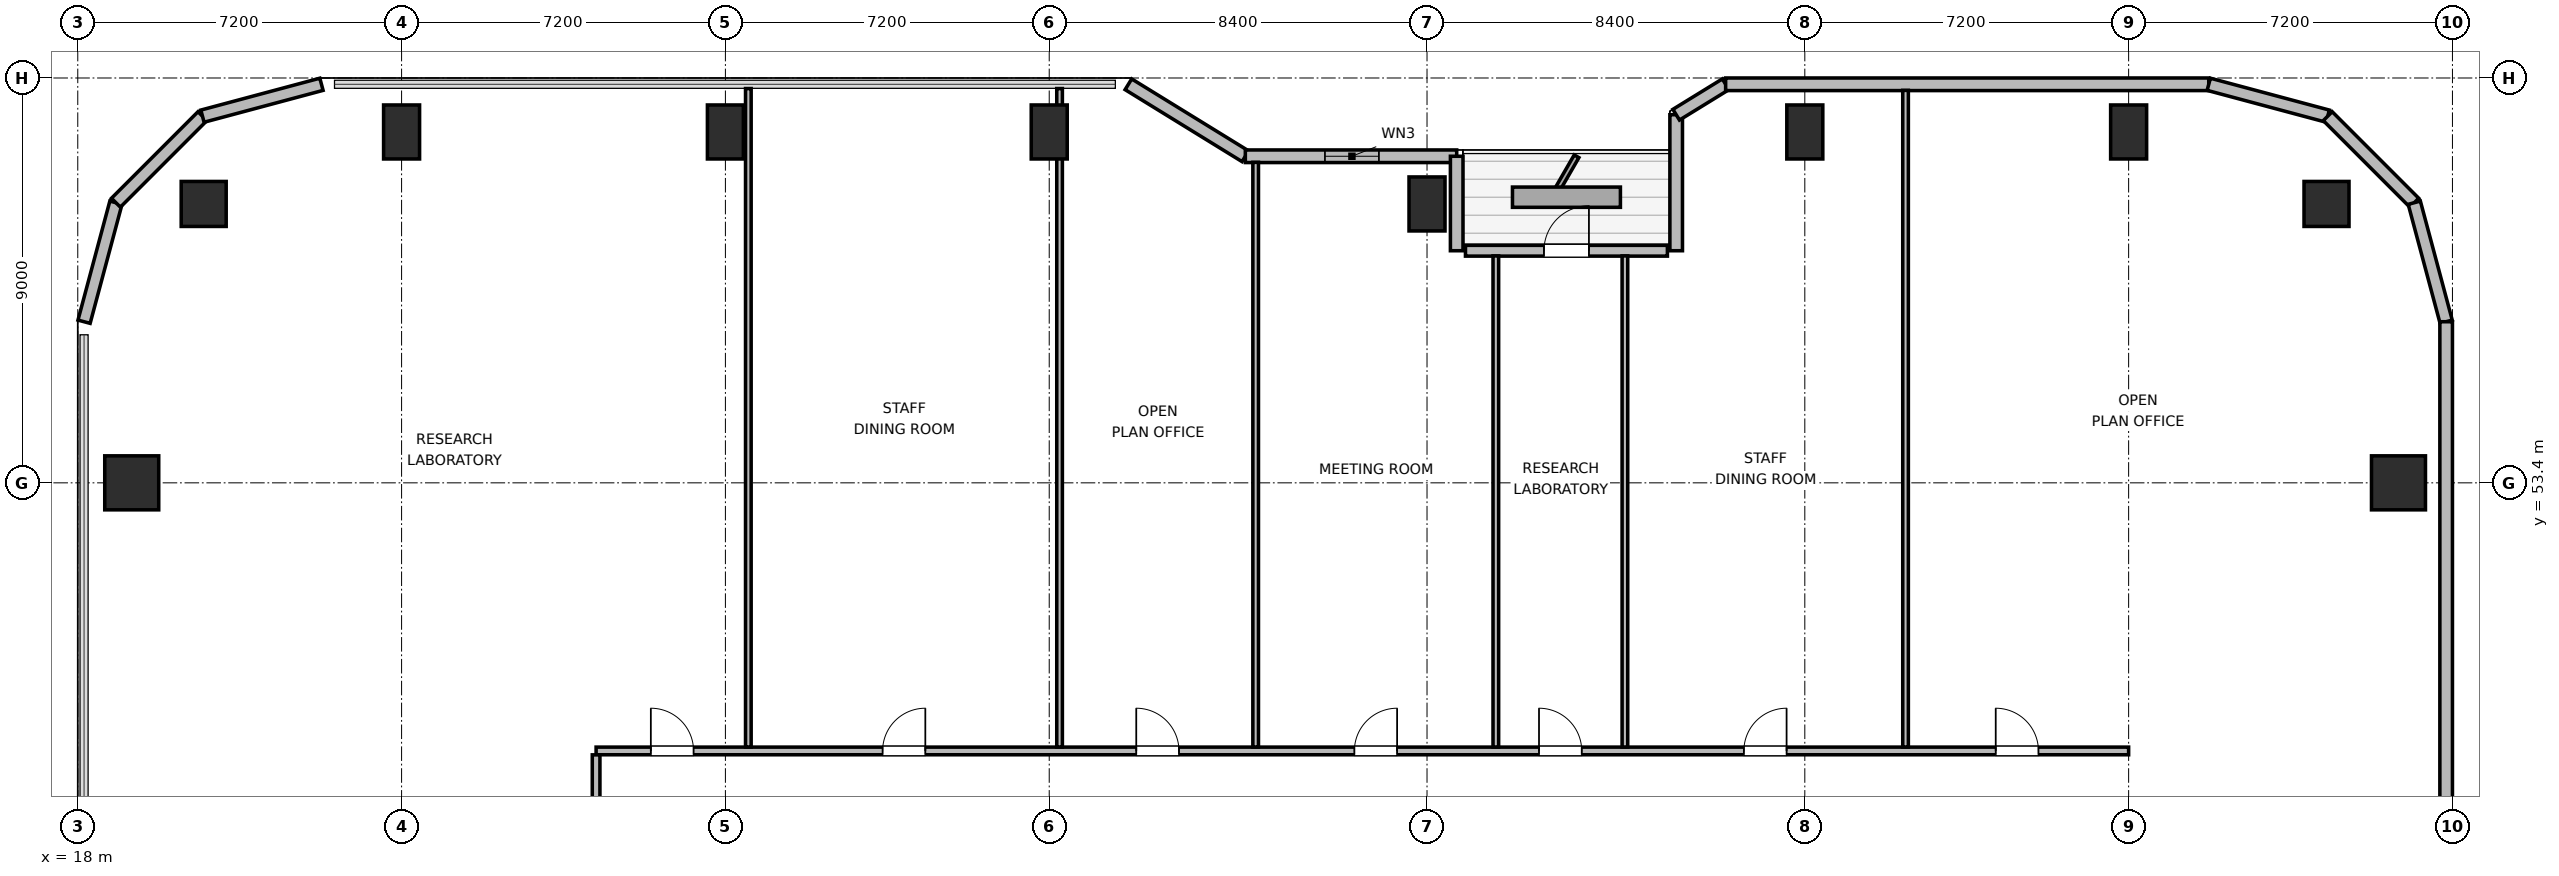
"""IFC4 building model, lengths in metres.
Left out: names, types, materials, properties, quantities, classifications, styles, units other than length and angle.
Written with IfcOpenShell. Run it as: python <this file> out.ifc"""

import sys

from ifc_helpers import new_model, si_unit, direction, frame, frame_2d, origin, origin_2d, place, context, subcontext, project, spatial, rectangle, circle, extrude, element, fill, save


model = new_model("IFC4")
c1 = context("Model", 3, precision=1e-05, world=origin(), true_north=direction((0.0, 1.0)))
c2 = subcontext(c1, "Body", "Model", "MODEL_VIEW")
j1 = project(units=[si_unit("LENGTHUNIT", "METRE"), si_unit("PLANEANGLEUNIT", "RADIAN")], contexts=[c1])
p1 = place(None, origin())
s1 = spatial("IfcSite", under=j1, at=p1, CompositionType="ELEMENT")
p2 = place(p1, origin())
s2 = spatial("IfcBuilding", under=s1, at=p2, CompositionType="ELEMENT")
p3 = place(p2, frame((0.0, 0.0, 177.9)))
s3 = spatial("IfcBuildingStorey", under=s2, at=p3, CompositionType="ELEMENT", Elevation=177.9)
for number, where, z_axis, x_axis in (
    (1, (68.0, 59.6, 0.0), (0.0, 0.0, 1.0), (1.0, 0.0, 0.0)),
    (2, (20.8, 59.6, 0.0), (0.0, 0.0, 1.0), (1.0, 0.0, 0.0)),
):
    element("IfcColumn", number, at=place(p3, frame(where, z_axis=z_axis, x_axis=x_axis)), inside=s3, PredefinedType="COLUMN", context=c2, shape_type="SweptSolid", body=[
        extrude(circle(Radius=0.5, at=origin_2d()), origin(), (0.0, 0.0, 1.0), 3.9),
    ])
for number, where, z_axis, x_axis in (
    (3, (25.2, 61.2, 0.0), (0.0, 0.0, 1.0), (1.0, 0.0, 0.0)),
    (4, (32.4, 61.2, 0.0), (0.0, 0.0, 1.0), (1.0, 0.0, 0.0)),
    (5, (39.6, 61.2, 0.0), (0.0, 0.0, 1.0), (1.0, 0.0, 0.0)),
    (6, (48.0, 59.6, 0.0), (0.0, 0.0, 1.0), (1.0, 0.0, 0.0)),
    (7, (56.4, 61.2, 0.0), (0.0, 0.0, 1.0), (1.0, 0.0, 0.0)),
    (8, (63.6, 61.2, 0.0), (0.0, 0.0, 1.0), (1.0, 0.0, 0.0)),
):
    element("IfcColumn", number, at=place(p3, frame(where, z_axis=z_axis, x_axis=x_axis)), inside=s3, PredefinedType="COLUMN", context=c2, shape_type="SweptSolid", body=[
        extrude(rectangle(XDim=0.8, YDim=1.2, at=origin_2d()), origin(), (0.0, 0.0, 1.0), 3.9),
    ])
for number, where, z_axis, x_axis in (
    (9, (19.2, 53.4, 0.0), (0.0, 0.0, 1.0), (1.0, 0.0, 0.0)),
    (10, (69.6, 53.4, 0.0), (0.0, 0.0, 1.0), (1.0, 0.0, 0.0)),
):
    element("IfcColumn", number, at=place(p3, frame(where, z_axis=z_axis, x_axis=x_axis)), inside=s3, PredefinedType="COLUMN", context=c2, shape_type="SweptSolid", body=[
        extrude(rectangle(XDim=1.2, YDim=1.2, at=origin_2d()), origin(), (0.0, 0.0, 1.0), 3.9),
    ])
p4 = place(p3, frame((18.14, 56.982, 0.0), z_axis=(0.0, 0.0, 1.0), x_axis=(0.258672222976, 0.9659651552, 0.0)))
e11 = element("IfcWall", 11, at=p4, inside=s3, PredefinedType="SOLIDWALL", context=c2, shape_type="SweptSolid", body=[
    extrude(rectangle(XDim=2.739, YDim=0.28, at=frame_2d((1.37, 0.0))), origin(), (0.0, 0.0, 1.0), 3.68),
])
p5 = place(p3, frame((18.848, 59.627, 0.0), z_axis=(0.0, 0.0, 1.0), x_axis=(0.707106781187, 0.707106781187, 0.0)))
e12 = element("IfcWall", 12, at=p5, inside=s3, PredefinedType="SOLIDWALL", context=c2, shape_type="SweptSolid", body=[
    extrude(rectangle(XDim=2.721, YDim=0.28, at=frame_2d((1.36, 0.0))), origin(), (0.0, 0.0, 1.0), 3.68),
])
p6 = place(p3, frame((20.772, 61.552, 0.0), z_axis=(0.0, 0.0, 1.0), x_axis=(0.965971118627, 0.258649952598, 0.0)))
e13 = element("IfcWall", 13, at=p6, inside=s3, PredefinedType="SOLIDWALL", context=c2, shape_type="SweptSolid", body=[
    extrude(rectangle(XDim=2.739, YDim=0.28, at=frame_2d((1.37, 0.0))), origin(), (0.0, 0.0, 1.0), 3.68),
])
p7 = place(p3, frame((41.36, 62.26, 0.0), z_axis=(0.0, 0.0, 1.0), x_axis=(0.851652825334, -0.524106349037, 0.0)))
e14 = element("IfcWall", 14, at=p7, inside=s3, PredefinedType="SOLIDWALL", context=c2, shape_type="SweptSolid", body=[
    extrude(rectangle(XDim=3.053, YDim=0.28, at=frame_2d((1.526, 0.0))), origin(), (0.0, 0.0, 1.0), 2.265),
])
p8 = place(p3, frame((43.96, 60.66, 0.0), z_axis=(0.0, 0.0, 1.0), x_axis=(1.0, 0.0, 0.0)))
e15 = element("IfcWall", 15, at=p8, inside=s3, PredefinedType="SOLIDWALL", context=c2, shape_type="SweptSolid", body=[
    extrude(rectangle(XDim=4.699, YDim=0.28, at=frame_2d((2.35, 0.0))), origin(), (0.0, 0.0, 1.0), 2.265),
])
p9 = place(p8, frame((1.77, 0.0, 0.85)))
e16 = element("IfcOpeningElement", 16, at=p9, cuts=e15, PredefinedType="OPENING", context=c2, shape_type="SweptSolid", body=[
    extrude(rectangle(XDim=1.2, YDim=1.1, at=frame_2d((0.6, 0.55))), frame((0.0, 0.15, 0.0), z_axis=(0.0, -1.0, 0.0), x_axis=(1.0, 0.0, 0.0)), (0.0, 0.0, 1.0), 0.3),
])
p10 = place(p3, frame((48.66, 60.66, 0.0), z_axis=(0.0, 0.0, 1.0), x_axis=(0.0, -1.0, 0.0)))
e17 = element("IfcWall", 17, at=p10, inside=s3, PredefinedType="SOLIDWALL", context=c2, shape_type="SweptSolid", body=[
    extrude(rectangle(XDim=2.1, YDim=0.28, at=frame_2d((1.05, 0.0))), origin(), (0.0, 0.0, 1.0), 2.265),
])
p11 = place(p3, frame((48.855, 58.56, 0.0), z_axis=(0.0, 0.0, 1.0), x_axis=(1.0, 0.0, 0.0)))
e18 = element("IfcWall", 18, at=p11, inside=s3, PredefinedType="SOLIDWALL", context=c2, shape_type="SweptSolid", body=[
    extrude(rectangle(XDim=4.49, YDim=0.24, at=frame_2d((2.245, 0.0))), origin(), (0.0, 0.0, 1.0), 3.68),
])
p12 = place(p11, frame((1.745, 0.0, 0.0)))
e19 = element("IfcOpeningElement", 19, at=p12, cuts=e18, PredefinedType="OPENING", context=c2, shape_type="SweptSolid", body=[
    extrude(rectangle(XDim=1.0, YDim=2.02, at=frame_2d((0.5, 1.01))), frame((0.0, 0.13, 0.0), z_axis=(0.0, -1.0, 0.0), x_axis=(1.0, 0.0, 0.0)), (0.0, 0.0, 1.0), 0.26),
])
p13 = place(p3, frame((53.54, 58.56, 0.0), z_axis=(0.0, 0.0, 1.0), x_axis=(0.0, 1.0, 0.0)))
e20 = element("IfcWall", 20, at=p13, inside=s3, PredefinedType="SOLIDWALL", context=c2, shape_type="SweptSolid", body=[
    extrude(rectangle(XDim=3.024, YDim=0.28, at=frame_2d((1.512, 0.0))), origin(), (0.0, 0.0, 1.0), 2.265),
])
p14 = place(p3, frame((53.54, 61.584, 0.0), z_axis=(0.0, 0.0, 1.0), x_axis=(0.851801140441, 0.523865266212, 0.0)))
e21 = element("IfcWall", 21, at=p14, inside=s3, PredefinedType="SOLIDWALL", context=c2, shape_type="SweptSolid", body=[
    extrude(rectangle(XDim=1.291, YDim=0.28, at=frame_2d((0.646, 0.0))), origin(), (0.0, 0.0, 1.0), 3.68),
])
p15 = place(p3, frame((54.64, 62.26, 0.0), z_axis=(0.0, 0.0, 1.0), x_axis=(1.0, 0.0, 0.0)))
e22 = element("IfcWall", 22, at=p15, inside=s3, PredefinedType="SOLIDWALL", context=c2, shape_type="SweptSolid", body=[
    extrude(rectangle(XDim=10.742, YDim=0.28, at=frame_2d((5.371, 0.0))), origin(), (0.0, 0.0, 1.0), 3.68),
])
p16 = place(p3, frame((65.382, 62.26, 0.0), z_axis=(0.0, 0.0, 1.0), x_axis=(0.965971118627, -0.258649952598, 0.0)))
e23 = element("IfcWall", 23, at=p16, inside=s3, PredefinedType="SOLIDWALL", context=c2, shape_type="SweptSolid", body=[
    extrude(rectangle(XDim=2.739, YDim=0.28, at=frame_2d((1.37, 0.0))), origin(), (0.0, 0.0, 1.0), 3.68),
])
p17 = place(p3, frame((68.028, 61.552, 0.0), z_axis=(0.0, 0.0, 1.0), x_axis=(0.707061915429, -0.707151644098, 0.0)))
e24 = element("IfcWall", 24, at=p17, inside=s3, PredefinedType="SOLIDWALL", context=c2, shape_type="SweptSolid", body=[
    extrude(rectangle(XDim=2.721, YDim=0.28, at=frame_2d((1.36, 0.0))), origin(), (0.0, 0.0, 1.0), 3.68),
])
p18 = place(p3, frame((69.951, 59.627, 0.0), z_axis=(0.0, 0.0, 1.0), x_axis=(0.258672222976, -0.9659651552, 0.0)))
e25 = element("IfcWall", 25, at=p18, inside=s3, PredefinedType="SOLIDWALL", context=c2, shape_type="SweptSolid", body=[
    extrude(rectangle(XDim=2.739, YDim=0.28, at=frame_2d((1.37, 0.0))), origin(), (0.0, 0.0, 1.0), 3.68),
])
p19 = place(p3, frame((70.66, 56.982, 0.0), z_axis=(0.0, 0.0, 1.0), x_axis=(0.0, -1.0, 0.0)))
e26 = element("IfcWall", 26, at=p19, inside=s3, PredefinedType="SOLIDWALL", context=c2, shape_type="SweptSolid", body=[
    extrude(rectangle(XDim=14.242, YDim=0.28, at=frame_2d((7.121, 0.0))), origin(), (0.0, 0.0, 1.0), 3.68),
])
p20 = place(p3, frame((29.525, 47.44, 0.0), z_axis=(0.0, 0.0, 1.0), x_axis=(1.0, 0.0, 0.0)))
e27 = element("IfcWall", 27, at=p20, inside=s3, PredefinedType="PARTITIONING", context=c2, shape_type="SweptSolid", body=[
    extrude(rectangle(XDim=34.075, YDim=0.17, at=frame_2d((17.038, 0.0))), origin(), (0.0, 0.0, 1.0), 3.68),
])
p21 = place(p20, frame((1.217, 0.0, 0.0)))
e28 = element("IfcOpeningElement", 28, at=p21, cuts=e27, PredefinedType="OPENING", context=c2, shape_type="SweptSolid", body=[
    extrude(rectangle(XDim=0.95, YDim=2.04, at=frame_2d((0.475, 1.02))), frame((0.0, 0.095, 0.0), z_axis=(0.0, -1.0, 0.0), x_axis=(1.0, 0.0, 0.0)), (0.0, 0.0, 1.0), 0.19),
])
p22 = place(p20, frame((6.37, 0.0, 0.0)))
e29 = element("IfcOpeningElement", 29, at=p22, cuts=e27, PredefinedType="OPENING", context=c2, shape_type="SweptSolid", body=[
    extrude(rectangle(XDim=0.95, YDim=2.04, at=frame_2d((0.475, 1.02))), frame((0.0, 0.095, 0.0), z_axis=(0.0, -1.0, 0.0), x_axis=(1.0, 0.0, 0.0)), (0.0, 0.0, 1.0), 0.19),
])
p23 = place(p20, frame((12.01, 0.0, 0.0)))
e30 = element("IfcOpeningElement", 30, at=p23, cuts=e27, PredefinedType="OPENING", context=c2, shape_type="SweptSolid", body=[
    extrude(rectangle(XDim=0.95, YDim=2.04, at=frame_2d((0.475, 1.02))), frame((0.0, 0.095, 0.0), z_axis=(0.0, -1.0, 0.0), x_axis=(1.0, 0.0, 0.0)), (0.0, 0.0, 1.0), 0.19),
])
p24 = place(p20, frame((16.86, 0.0, 0.0)))
e31 = element("IfcOpeningElement", 31, at=p24, cuts=e27, PredefinedType="OPENING", context=c2, shape_type="SweptSolid", body=[
    extrude(rectangle(XDim=0.95, YDim=2.04, at=frame_2d((0.475, 1.02))), frame((0.0, 0.095, 0.0), z_axis=(0.0, -1.0, 0.0), x_axis=(1.0, 0.0, 0.0)), (0.0, 0.0, 1.0), 0.19),
])
p25 = place(p20, frame((20.965, 0.0, 0.0)))
e32 = element("IfcOpeningElement", 32, at=p25, cuts=e27, PredefinedType="OPENING", context=c2, shape_type="SweptSolid", body=[
    extrude(rectangle(XDim=0.95, YDim=2.04, at=frame_2d((0.475, 1.02))), frame((0.0, 0.095, 0.0), z_axis=(0.0, -1.0, 0.0), x_axis=(1.0, 0.0, 0.0)), (0.0, 0.0, 1.0), 0.19),
])
p26 = place(p20, frame((25.52, 0.0, 0.0)))
e33 = element("IfcOpeningElement", 33, at=p26, cuts=e27, PredefinedType="OPENING", context=c2, shape_type="SweptSolid", body=[
    extrude(rectangle(XDim=0.95, YDim=2.04, at=frame_2d((0.475, 1.02))), frame((0.0, 0.095, 0.0), z_axis=(0.0, -1.0, 0.0), x_axis=(1.0, 0.0, 0.0)), (0.0, 0.0, 1.0), 0.19),
])
p27 = place(p20, frame((31.12, 0.0, 0.0)))
e34 = element("IfcOpeningElement", 34, at=p27, cuts=e27, PredefinedType="OPENING", context=c2, shape_type="SweptSolid", body=[
    extrude(rectangle(XDim=0.95, YDim=2.04, at=frame_2d((0.475, 1.02))), frame((0.0, 0.095, 0.0), z_axis=(0.0, -1.0, 0.0), x_axis=(1.0, 0.0, 0.0)), (0.0, 0.0, 1.0), 0.19),
])
p28 = place(p3, frame((29.525, 37.1, 0.0), z_axis=(0.0, 0.0, 1.0), x_axis=(0.0, 1.0, 0.0)))
e35 = element("IfcWall", 35, at=p28, inside=s3, PredefinedType="PARTITIONING", context=c2, shape_type="SweptSolid", body=[
    extrude(rectangle(XDim=10.253, YDim=0.17, at=frame_2d((5.126, 0.0))), origin(), (0.0, 0.0, 1.0), 3.68),
])
p29 = place(p28, frame((4.695, 0.0, 0.0)))
e36 = element("IfcOpeningElement", 36, at=p29, cuts=e35, PredefinedType="OPENING", context=c2, shape_type="SweptSolid", body=[
    extrude(rectangle(XDim=0.95, YDim=2.04, at=frame_2d((0.475, 1.02))), frame((0.0, 0.095, 0.0), z_axis=(0.0, -1.0, 0.0), x_axis=(1.0, 0.0, 0.0)), (0.0, 0.0, 1.0), 0.19),
])
p30 = place(p3, frame((32.91, 47.527, 0.0), z_axis=(0.0, 0.0, 1.0), x_axis=(0.0, 1.0, 0.0)))
e37 = element("IfcWall", 37, at=p30, inside=s3, PredefinedType="PARTITIONING", context=c2, shape_type="SweptSolid", body=[
    extrude(rectangle(XDim=14.638, YDim=0.125, at=frame_2d((7.319, 0.0))), origin(), (0.0, 0.0, 1.0), 3.68),
])
p31 = place(p3, frame((39.83, 47.527, 0.0), z_axis=(0.0, 0.0, 1.0), x_axis=(0.0, 1.0, 0.0)))
e38 = element("IfcWall", 38, at=p31, inside=s3, PredefinedType="PARTITIONING", context=c2, shape_type="SweptSolid", body=[
    extrude(rectangle(XDim=14.638, YDim=0.125, at=frame_2d((7.319, 0.0))), origin(), (0.0, 0.0, 1.0), 3.043),
])
p32 = place(p3, frame((44.19, 47.527, 0.0), z_axis=(0.0, 0.0, 1.0), x_axis=(0.0, 1.0, 0.0)))
e39 = element("IfcWall", 39, at=p32, inside=s3, PredefinedType="PARTITIONING", context=c2, shape_type="SweptSolid", body=[
    extrude(rectangle(XDim=12.998, YDim=0.125, at=frame_2d((6.499, 0.0))), origin(), (0.0, 0.0, 1.0), 3.043),
])
p33 = place(p3, frame((49.53, 47.527, 0.0), z_axis=(0.0, 0.0, 1.0), x_axis=(0.0, 1.0, 0.0)))
e40 = element("IfcWall", 40, at=p33, inside=s3, PredefinedType="PARTITIONING", context=c2, shape_type="SweptSolid", body=[
    extrude(rectangle(XDim=10.918, YDim=0.125, at=frame_2d((5.459, 0.0))), origin(), (0.0, 0.0, 1.0), 3.68),
])
p34 = place(p3, frame((52.4, 47.527, 0.0), z_axis=(0.0, 0.0, 1.0), x_axis=(0.0, 1.0, 0.0)))
e41 = element("IfcWall", 41, at=p34, inside=s3, PredefinedType="PARTITIONING", context=c2, shape_type="SweptSolid", body=[
    extrude(rectangle(XDim=10.918, YDim=0.125, at=frame_2d((5.459, 0.0))), origin(), (0.0, 0.0, 1.0), 3.043),
])
p35 = place(p3, frame((58.64, 47.527, 0.0), z_axis=(0.0, 0.0, 1.0), x_axis=(0.0, 1.0, 0.0)))
e42 = element("IfcWall", 42, at=p35, inside=s3, PredefinedType="PARTITIONING", context=c2, shape_type="SweptSolid", body=[
    extrude(rectangle(XDim=14.598, YDim=0.125, at=frame_2d((7.299, 0.0))), origin(), (0.0, 0.0, 1.0), 3.68),
])
p36 = place(p9, origin())
e43 = element("IfcWindow", 43, at=p36, inside=s3, PartitioningType="SINGLE_PANEL", PredefinedType="WINDOW", context=c2, shape_type="SweptSolid", body=[
    extrude(rectangle(XDim=1.2, YDim=1.1, at=frame_2d((0.6, 0.55))), frame((0.0, 0.03, 0.0), z_axis=(0.0, -1.0, 0.0), x_axis=(1.0, 0.0, 0.0)), (0.0, 0.0, 1.0), 0.06),
])
fill(e16, e43)
p37 = place(p12, origin())
e44 = element("IfcDoor", 44, at=p37, inside=s3, OperationType="SINGLE_SWING_RIGHT", PredefinedType="DOOR", context=c2, shape_type="SweptSolid", body=[
    extrude(rectangle(XDim=1.0, YDim=2.02, at=frame_2d((0.5, 1.01))), frame((0.0, 0.025, 0.0), z_axis=(0.0, -1.0, 0.0), x_axis=(1.0, 0.0, 0.0)), (0.0, 0.0, 1.0), 0.05),
])
fill(e19, e44)
p38 = place(p21, origin())
e45 = element("IfcDoor", 45, at=p38, inside=s3, OperationType="SINGLE_SWING_LEFT", PredefinedType="DOOR", context=c2, shape_type="SweptSolid", body=[
    extrude(rectangle(XDim=0.95, YDim=2.04, at=frame_2d((0.475, 1.02))), frame((0.0, 0.025, 0.0), z_axis=(0.0, -1.0, 0.0), x_axis=(1.0, 0.0, 0.0)), (0.0, 0.0, 1.0), 0.05),
])
fill(e28, e45)
p39 = place(p22, origin())
e46 = element("IfcDoor", 46, at=p39, inside=s3, OperationType="SINGLE_SWING_RIGHT", PredefinedType="DOOR", context=c2, shape_type="SweptSolid", body=[
    extrude(rectangle(XDim=0.95, YDim=2.04, at=frame_2d((0.475, 1.02))), frame((0.0, 0.025, 0.0), z_axis=(0.0, -1.0, 0.0), x_axis=(1.0, 0.0, 0.0)), (0.0, 0.0, 1.0), 0.05),
])
fill(e29, e46)
p40 = place(p23, origin())
e47 = element("IfcDoor", 47, at=p40, inside=s3, OperationType="SINGLE_SWING_LEFT", PredefinedType="DOOR", context=c2, shape_type="SweptSolid", body=[
    extrude(rectangle(XDim=0.95, YDim=2.04, at=frame_2d((0.475, 1.02))), frame((0.0, 0.025, 0.0), z_axis=(0.0, -1.0, 0.0), x_axis=(1.0, 0.0, 0.0)), (0.0, 0.0, 1.0), 0.05),
])
fill(e30, e47)
p41 = place(p24, origin())
e48 = element("IfcDoor", 48, at=p41, inside=s3, OperationType="SINGLE_SWING_RIGHT", PredefinedType="DOOR", context=c2, shape_type="SweptSolid", body=[
    extrude(rectangle(XDim=0.95, YDim=2.04, at=frame_2d((0.475, 1.02))), frame((0.0, 0.025, 0.0), z_axis=(0.0, -1.0, 0.0), x_axis=(1.0, 0.0, 0.0)), (0.0, 0.0, 1.0), 0.05),
])
fill(e31, e48)
p42 = place(p25, origin())
e49 = element("IfcDoor", 49, at=p42, inside=s3, OperationType="SINGLE_SWING_LEFT", PredefinedType="DOOR", context=c2, shape_type="SweptSolid", body=[
    extrude(rectangle(XDim=0.95, YDim=2.04, at=frame_2d((0.475, 1.02))), frame((0.0, 0.025, 0.0), z_axis=(0.0, -1.0, 0.0), x_axis=(1.0, 0.0, 0.0)), (0.0, 0.0, 1.0), 0.05),
])
fill(e32, e49)
p43 = place(p26, origin())
e50 = element("IfcDoor", 50, at=p43, inside=s3, OperationType="SINGLE_SWING_RIGHT", PredefinedType="DOOR", context=c2, shape_type="SweptSolid", body=[
    extrude(rectangle(XDim=0.95, YDim=2.04, at=frame_2d((0.475, 1.02))), frame((0.0, 0.025, 0.0), z_axis=(0.0, -1.0, 0.0), x_axis=(1.0, 0.0, 0.0)), (0.0, 0.0, 1.0), 0.05),
])
fill(e33, e50)
p44 = place(p27, origin())
e51 = element("IfcDoor", 51, at=p44, inside=s3, OperationType="SINGLE_SWING_LEFT", PredefinedType="DOOR", context=c2, shape_type="SweptSolid", body=[
    extrude(rectangle(XDim=0.95, YDim=2.04, at=frame_2d((0.475, 1.02))), frame((0.0, 0.025, 0.0), z_axis=(0.0, -1.0, 0.0), x_axis=(1.0, 0.0, 0.0)), (0.0, 0.0, 1.0), 0.05),
])
fill(e34, e51)
save(model, sys.argv[1])
